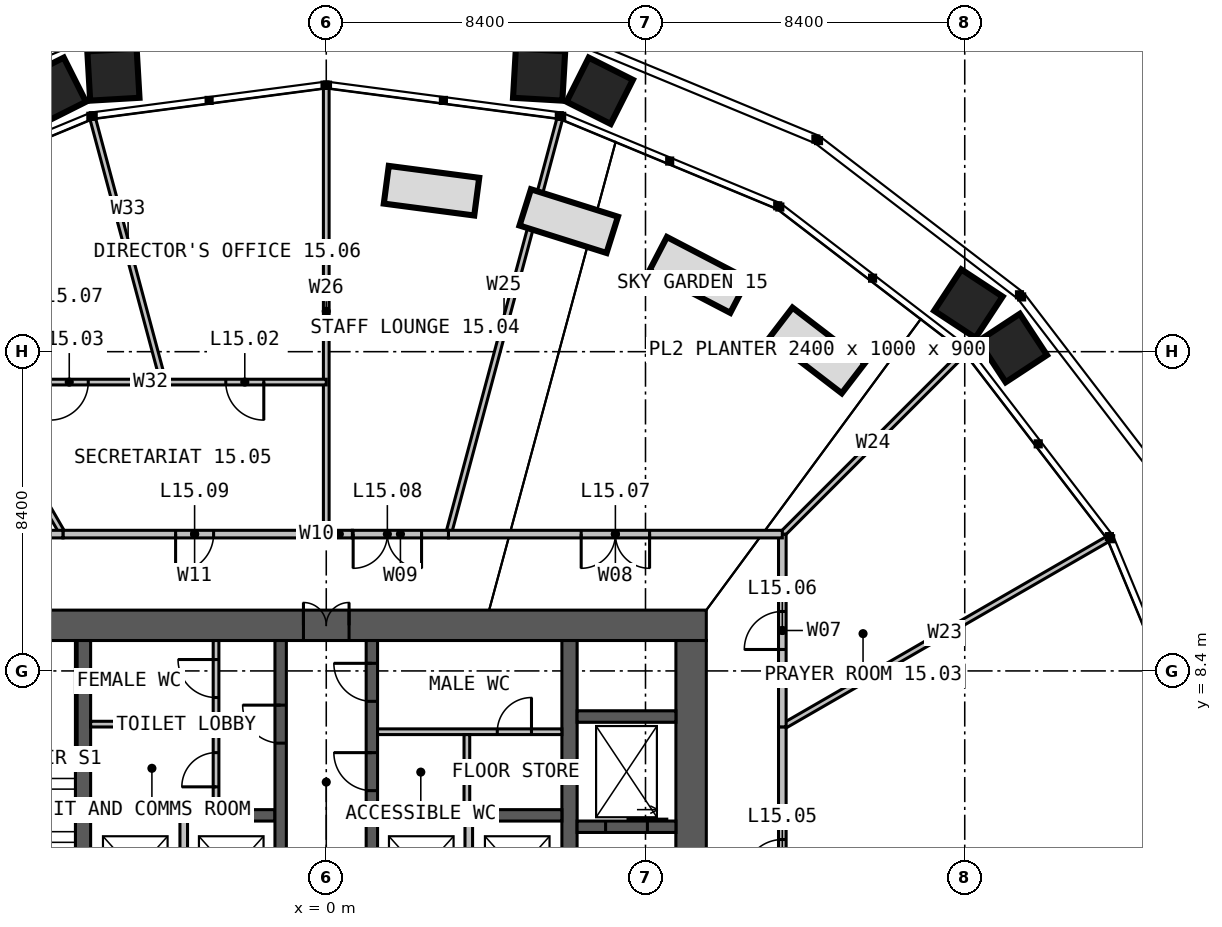
"""IFC4 building model, lengths in metres.
Left out: names, types, materials, properties, quantities, classifications, styles, units other than length and angle.
Written with IfcOpenShell. Run it as: python <this file> out.ifc"""

import sys

from ifc_helpers import new_model, si_unit, direction, frame, frame_2d, origin, place, context, subcontext, project, spatial, rectangle, extrude, element, fill, save


model = new_model("IFC4")
c1 = context("Model", 3, precision=1e-05, world=origin(), true_north=direction((0.0, 1.0)))
c2 = subcontext(c1, "Body", "Model", "MODEL_VIEW")
j1 = project(units=[si_unit("LENGTHUNIT", "METRE"), si_unit("PLANEANGLEUNIT", "RADIAN")], contexts=[c1])
p1 = place(None, origin())
s1 = spatial("IfcSite", under=j1, at=p1, CompositionType="ELEMENT")
p2 = place(p1, origin())
s2 = spatial("IfcBuilding", under=s1, at=p2, CompositionType="ELEMENT")
p3 = place(p2, frame((0.0, 0.0, 65.0)))
s3 = spatial("IfcBuildingStorey", under=s2, at=p3, CompositionType="ELEMENT", Elevation=65.0)
p4 = place(p3, frame((-10.0, 9.6, 0.0), z_axis=(0.0, 0.0, 1.0), x_axis=(1.0, 0.0, 0.0)))
e1 = element("IfcWall", 1, at=p4, inside=s3, PredefinedType="SOLIDWALL", context=c2, shape_type="SweptSolid", body=[
    extrude(rectangle(XDim=20.0, YDim=0.8, at=frame_2d((10.0, 0.0))), origin(), (0.0, 0.0, 1.0), 4.0),
])
p5 = place(p4, frame((9.4, 0.0, 0.0)))
e2 = element("IfcOpeningElement", 2, at=p5, cuts=e1, PredefinedType="OPENING", context=c2, shape_type="SweptSolid", body=[
    extrude(rectangle(XDim=1.2, YDim=2.2, at=frame_2d((0.6, 1.1))), frame((0.0, 0.41, 0.0), z_axis=(0.0, -1.0, 0.0), x_axis=(1.0, 0.0, 0.0)), (0.0, 0.0, 1.0), 0.82),
])
p6 = place(p3, frame((9.6, -9.2, 0.0), z_axis=(0.0, 0.0, 1.0), x_axis=(0.0, 1.0, 0.0)))
e3 = element("IfcWall", 3, at=p6, inside=s3, PredefinedType="SOLIDWALL", context=c2, shape_type="SweptSolid", body=[
    extrude(rectangle(XDim=18.4, YDim=0.8, at=frame_2d((9.2, 0.0))), origin(), (0.0, 0.0, 1.0), 4.0),
])
p7 = place(p3, frame((-6.4, -9.2, 0.0), z_axis=(0.0, 0.0, 1.0), x_axis=(0.0, 1.0, 0.0)))
e4 = element("IfcWall", 4, at=p7, inside=s3, PredefinedType="SOLIDWALL", context=c2, shape_type="SweptSolid", body=[
    extrude(rectangle(XDim=18.4, YDim=0.4, at=frame_2d((9.2, 0.0))), origin(), (0.0, 0.0, 1.0), 4.0),
])
p8 = place(p7, frame((8.7, 0.0, 0.0)))
e5 = element("IfcOpeningElement", 5, at=p8, cuts=e4, PredefinedType="OPENING", context=c2, shape_type="SweptSolid", body=[
    extrude(rectangle(XDim=1.0, YDim=2.2, at=frame_2d((0.5, 1.1))), frame((0.0, 0.21, 0.0), z_axis=(0.0, -1.0, 0.0), x_axis=(1.0, 0.0, 0.0)), (0.0, 0.0, 1.0), 0.42),
])
p9 = place(p3, frame((6.4, 9.2, 0.0), z_axis=(0.0, 0.0, 1.0), x_axis=(0.0, -1.0, 0.0)))
e6 = element("IfcWall", 6, at=p9, inside=s3, PredefinedType="SOLIDWALL", context=c2, shape_type="SweptSolid", body=[
    extrude(rectangle(XDim=18.4, YDim=0.4, at=frame_2d((9.2, 0.0))), origin(), (0.0, 0.0, 1.0), 4.0),
])
p10 = place(p9, frame((8.7, 0.0, 0.0)))
e7 = element("IfcOpeningElement", 7, at=p10, cuts=e6, PredefinedType="OPENING", context=c2, shape_type="SweptSolid", body=[
    extrude(rectangle(XDim=1.0, YDim=2.2, at=frame_2d((0.5, 1.1))), frame((0.0, 0.21, 0.0), z_axis=(0.0, -1.0, 0.0), x_axis=(1.0, 0.0, 0.0)), (0.0, 0.0, 1.0), 0.42),
])
for number, where, z_axis, x_axis in (
    (8, (-6.2, 4.6, 0.0), (0.0, 0.0, 1.0), (1.0, 0.0, 0.0)),
    (9, (1.35, 4.6, 0.0), (0.0, 0.0, 1.0), (1.0, 0.0, 0.0)),
):
    element("IfcWall", number, at=place(p3, frame(where, z_axis=z_axis, x_axis=x_axis)), inside=s3, PredefinedType="SOLIDWALL", context=c2, shape_type="SweptSolid", body=[
        extrude(rectangle(XDim=4.85, YDim=0.3, at=frame_2d((2.425, 0.0))), origin(), (0.0, 0.0, 1.0), 4.0),
    ])
p11 = place(p3, frame((-1.2, 1.45, 0.0), z_axis=(0.0, 0.0, 1.0), x_axis=(0.0, 1.0, 0.0)))
e10 = element("IfcWall", 10, at=p11, inside=s3, PredefinedType="SOLIDWALL", context=c2, shape_type="SweptSolid", body=[
    extrude(rectangle(XDim=7.75, YDim=0.3, at=frame_2d((3.875, 0.0))), origin(), (0.0, 0.0, 1.0), 4.0),
])
p12 = place(p11, frame((5.05, 0.0, 0.0)))
e11 = element("IfcOpeningElement", 11, at=p12, cuts=e10, PredefinedType="OPENING", context=c2, shape_type="SweptSolid", body=[
    extrude(rectangle(XDim=1.0, YDim=2.2, at=frame_2d((0.5, 1.1))), frame((0.0, 0.16, 0.0), z_axis=(0.0, -1.0, 0.0), x_axis=(1.0, 0.0, 0.0)), (0.0, 0.0, 1.0), 0.32),
])
p13 = place(p3, frame((1.2, 1.45, 0.0), z_axis=(0.0, 0.0, 1.0), x_axis=(0.0, 1.0, 0.0)))
e12 = element("IfcWall", 12, at=p13, inside=s3, PredefinedType="SOLIDWALL", context=c2, shape_type="SweptSolid", body=[
    extrude(rectangle(XDim=7.75, YDim=0.3, at=frame_2d((3.875, 0.0))), origin(), (0.0, 0.0, 1.0), 4.0),
])
p14 = place(p13, frame((3.8, 0.0, 0.0)))
e13 = element("IfcOpeningElement", 13, at=p14, cuts=e12, PredefinedType="OPENING", context=c2, shape_type="SweptSolid", body=[
    extrude(rectangle(XDim=1.0, YDim=2.2, at=frame_2d((0.5, 1.1))), frame((0.0, 0.16, 0.0), z_axis=(0.0, -1.0, 0.0), x_axis=(1.0, 0.0, 0.0)), (0.0, 0.0, 1.0), 0.32),
])
p15 = place(p13, frame((6.15, 0.0, 0.0)))
e14 = element("IfcOpeningElement", 14, at=p15, cuts=e12, PredefinedType="OPENING", context=c2, shape_type="SweptSolid", body=[
    extrude(rectangle(XDim=1.0, YDim=2.2, at=frame_2d((0.5, 1.1))), frame((0.0, 0.16, 0.0), z_axis=(0.0, -1.0, 0.0), x_axis=(1.0, 0.0, 0.0)), (0.0, 0.0, 1.0), 0.32),
])
p16 = place(p3, frame((6.6, 4.3, 0.0), z_axis=(0.0, 0.0, 1.0), x_axis=(1.0, 0.0, 0.0)))
e15 = element("IfcWall", 15, at=p16, inside=s3, PredefinedType="SOLIDWALL", context=c2, shape_type="SweptSolid", body=[
    extrude(rectangle(XDim=2.6, YDim=0.3, at=frame_2d((1.3, 0.0))), origin(), (0.0, 0.0, 1.0), 4.0),
])
p17 = place(p16, frame((0.75, 0.0, 0.0)))
e16 = element("IfcOpeningElement", 16, at=p17, cuts=e15, PredefinedType="OPENING", context=c2, shape_type="SweptSolid", body=[
    extrude(rectangle(XDim=1.1, YDim=2.2, at=frame_2d((0.55, 1.1))), frame((0.0, 0.16, 0.0), z_axis=(0.0, -1.0, 0.0), x_axis=(1.0, 0.0, 0.0)), (0.0, 0.0, 1.0), 0.32),
])
p18 = place(p3, frame((6.6, 7.2, 0.0), z_axis=(0.0, 0.0, 1.0), x_axis=(1.0, 0.0, 0.0)))
e17 = element("IfcWall", 17, at=p18, inside=s3, PredefinedType="SOLIDWALL", context=c2, shape_type="SweptSolid", body=[
    extrude(rectangle(XDim=2.6, YDim=0.3, at=frame_2d((1.3, 0.0))), origin(), (0.0, 0.0, 1.0), 4.0),
])
for number, where, z_axis, x_axis in (
    (18, (-3.75, 1.75, 0.0), (0.0, 0.0, 1.0), (0.0, 1.0, 0.0)),
    (19, (3.75, 1.75, 0.0), (0.0, 0.0, 1.0), (0.0, 1.0, 0.0)),
):
    element("IfcWall", number, at=place(p3, frame(where, z_axis=z_axis, x_axis=x_axis)), inside=s3, PredefinedType="SOLIDWALL", context=c2, shape_type="SweptSolid", body=[
        extrude(rectangle(XDim=2.7, YDim=0.2, at=frame_2d((1.35, 0.0))), origin(), (0.0, 0.0, 1.0), 3.75),
    ])
p19 = place(p3, frame((1.35, 6.8, 0.0), z_axis=(0.0, 0.0, 1.0), x_axis=(1.0, 0.0, 0.0)))
e20 = element("IfcWall", 20, at=p19, inside=s3, PredefinedType="PARTITIONING", context=c2, shape_type="SweptSolid", body=[
    extrude(rectangle(XDim=4.85, YDim=0.15, at=frame_2d((2.425, 0.0))), origin(), (0.0, 0.0, 1.0), 3.75),
])
p20 = place(p19, frame((3.15, 0.0, 0.0)))
e21 = element("IfcOpeningElement", 21, at=p20, cuts=e20, PredefinedType="OPENING", context=c2, shape_type="SweptSolid", body=[
    extrude(rectangle(XDim=0.9, YDim=2.2, at=frame_2d((0.45, 1.1))), frame((0.0, 0.085, 0.0), z_axis=(0.0, -1.0, 0.0), x_axis=(1.0, 0.0, 0.0)), (0.0, 0.0, 1.0), 0.17),
])
p21 = place(p3, frame((3.7, 4.75, 0.0), z_axis=(0.0, 0.0, 1.0), x_axis=(0.0, 1.0, 0.0)))
e22 = element("IfcWall", 22, at=p21, inside=s3, PredefinedType="PARTITIONING", context=c2, shape_type="SweptSolid", body=[
    extrude(rectangle(XDim=1.975, YDim=0.15, at=frame_2d((0.988, 0.0))), origin(), (0.0, 0.0, 1.0), 3.75),
])
p22 = place(p3, frame((-2.9, 4.75, 0.0), z_axis=(0.0, 0.0, 1.0), x_axis=(0.0, 1.0, 0.0)))
e23 = element("IfcWall", 23, at=p22, inside=s3, PredefinedType="PARTITIONING", context=c2, shape_type="SweptSolid", body=[
    extrude(rectangle(XDim=4.45, YDim=0.15, at=frame_2d((2.225, 0.0))), origin(), (0.0, 0.0, 1.0), 3.75),
])
p23 = place(p22, frame((2.95, 0.0, 0.0)))
e24 = element("IfcOpeningElement", 24, at=p23, cuts=e23, PredefinedType="OPENING", context=c2, shape_type="SweptSolid", body=[
    extrude(rectangle(XDim=1.0, YDim=2.2, at=frame_2d((0.5, 1.1))), frame((0.0, 0.085, 0.0), z_axis=(0.0, -1.0, 0.0), x_axis=(1.0, 0.0, 0.0)), (0.0, 0.0, 1.0), 0.17),
])
p24 = place(p22, frame((0.6, 0.0, 0.0)))
e25 = element("IfcOpeningElement", 25, at=p24, cuts=e23, PredefinedType="OPENING", context=c2, shape_type="SweptSolid", body=[
    extrude(rectangle(XDim=0.9, YDim=2.2, at=frame_2d((0.45, 1.1))), frame((0.0, 0.085, 0.0), z_axis=(0.0, -1.0, 0.0), x_axis=(1.0, 0.0, 0.0)), (0.0, 0.0, 1.0), 0.17),
])
p25 = place(p3, frame((-6.2, 7.0, 0.0), z_axis=(0.0, 0.0, 1.0), x_axis=(1.0, 0.0, 0.0)))
e26 = element("IfcWall", 26, at=p25, inside=s3, PredefinedType="PARTITIONING", context=c2, shape_type="SweptSolid", body=[
    extrude(rectangle(XDim=3.225, YDim=0.15, at=frame_2d((1.612, 0.0))), origin(), (0.0, 0.0, 1.0), 3.75),
])
p26 = place(p3, frame((12.0, 6.928, 0.0), z_axis=(0.0, 0.0, 1.0), x_axis=(0.866031940362, 0.499988678145, 0.0)))
e27 = element("IfcWall", 27, at=p26, inside=s3, PredefinedType="PARTITIONING", context=c2, shape_type="SweptSolid", body=[
    extrude(rectangle(XDim=9.87, YDim=0.15, at=frame_2d((4.935, 0.0))), origin(), (0.0, 0.0, 1.0), 2.79),
])
p27 = place(p3, frame((12.0, 12.0, 0.0), z_axis=(0.0, 0.0, 1.0), x_axis=(0.707106781187, 0.707106781187, 0.0)))
e28 = element("IfcWall", 28, at=p27, inside=s3, PredefinedType="PARTITIONING", context=c2, shape_type="SweptSolid", body=[
    extrude(rectangle(XDim=6.756, YDim=0.15, at=frame_2d((3.378, 0.0))), origin(), (0.0, 0.0, 1.0), 2.79),
])
p28 = place(p3, frame((3.215, 12.0, 0.0), z_axis=(0.0, 0.0, 1.0), x_axis=(0.258830735057, 0.965922693899, 0.0)))
e29 = element("IfcWall", 29, at=p28, inside=s3, PredefinedType="PARTITIONING", context=c2, shape_type="SweptSolid", body=[
    extrude(rectangle(XDim=11.303, YDim=0.15, at=frame_2d((5.651, 0.0))), origin(), (0.0, 0.0, 1.0), 2.79),
])
p29 = place(p3, frame((0.0, 12.0, 0.0), z_axis=(0.0, 0.0, 1.0), x_axis=(0.0, 1.0, 0.0)))
e30 = element("IfcWall", 30, at=p29, inside=s3, PredefinedType="PARTITIONING", context=c2, shape_type="SweptSolid", body=[
    extrude(rectangle(XDim=11.726, YDim=0.15, at=frame_2d((5.863, 0.0))), origin(), (0.0, 0.0, 1.0), 2.79),
])
p30 = place(p3, frame((-6.928, 12.0, 0.0), z_axis=(0.0, 0.0, 1.0), x_axis=(-0.499988678145, 0.866031940362, 0.0)))
e31 = element("IfcWall", 31, at=p30, inside=s3, PredefinedType="PARTITIONING", context=c2, shape_type="SweptSolid", body=[
    extrude(rectangle(XDim=9.87, YDim=0.15, at=frame_2d((4.935, 0.0))), origin(), (0.0, 0.0, 1.0), 2.79),
])
p31 = place(p3, frame((12.0, 0.0, 0.0), z_axis=(0.0, 0.0, 1.0), x_axis=(0.0, 1.0, 0.0)))
e32 = element("IfcWall", 32, at=p31, inside=s3, PredefinedType="PARTITIONING", context=c2, shape_type="SweptSolid", body=[
    extrude(rectangle(XDim=6.928, YDim=0.2, at=frame_2d((3.464, 0.0))), origin(), (0.0, 0.0, 1.0), 3.8),
])
p32 = place(p31, frame((2.964, 0.0, 0.0)))
e33 = element("IfcOpeningElement", 33, at=p32, cuts=e32, PredefinedType="OPENING", context=c2, shape_type="SweptSolid", body=[
    extrude(rectangle(XDim=1.0, YDim=2.2, at=frame_2d((0.5, 1.1))), frame((0.0, 0.11, 0.0), z_axis=(0.0, -1.0, 0.0), x_axis=(1.0, 0.0, 0.0)), (0.0, 0.0, 1.0), 0.22),
])
p33 = place(p3, frame((12.0, 6.928, 0.0), z_axis=(0.0, 0.0, 1.0), x_axis=(0.0, 1.0, 0.0)))
e34 = element("IfcWall", 34, at=p33, inside=s3, PredefinedType="PARTITIONING", context=c2, shape_type="SweptSolid", body=[
    extrude(rectangle(XDim=5.072, YDim=0.2, at=frame_2d((2.536, 0.0))), origin(), (0.0, 0.0, 1.0), 3.8),
])
p34 = place(p33, frame((2.036, 0.0, 0.0)))
e35 = element("IfcOpeningElement", 35, at=p34, cuts=e34, PredefinedType="OPENING", context=c2, shape_type="SweptSolid", body=[
    extrude(rectangle(XDim=1.0, YDim=2.2, at=frame_2d((0.5, 1.1))), frame((0.0, 0.11, 0.0), z_axis=(0.0, -1.0, 0.0), x_axis=(1.0, 0.0, 0.0)), (0.0, 0.0, 1.0), 0.22),
])
p35 = place(p3, frame((12.0, 12.0, 0.0), z_axis=(0.0, 0.0, 1.0), x_axis=(-1.0, 0.0, 0.0)))
e36 = element("IfcWall", 36, at=p35, inside=s3, PredefinedType="PARTITIONING", context=c2, shape_type="SweptSolid", body=[
    extrude(rectangle(XDim=8.785, YDim=0.2, at=frame_2d((4.392, 0.0))), origin(), (0.0, 0.0, 1.0), 3.2),
])
p36 = place(p35, frame((3.492, 0.0, 0.0)))
e37 = element("IfcOpeningElement", 37, at=p36, cuts=e36, PredefinedType="OPENING", context=c2, shape_type="SweptSolid", body=[
    extrude(rectangle(XDim=1.8, YDim=2.2, at=frame_2d((0.9, 1.1))), frame((0.0, 0.11, 0.0), z_axis=(0.0, -1.0, 0.0), x_axis=(1.0, 0.0, 0.0)), (0.0, 0.0, 1.0), 0.22),
])
p37 = place(p3, frame((3.215, 12.0, 0.0), z_axis=(0.0, 0.0, 1.0), x_axis=(-1.0, 0.0, 0.0)))
e38 = element("IfcWall", 38, at=p37, inside=s3, PredefinedType="PARTITIONING", context=c2, shape_type="SweptSolid", body=[
    extrude(rectangle(XDim=2.528, YDim=0.2, at=frame_2d((1.264, 0.0))), origin(), (0.0, 0.0, 1.0), 3.2),
])
p38 = place(p37, frame((0.708, 0.0, 0.0)))
e39 = element("IfcOpeningElement", 39, at=p38, cuts=e38, PredefinedType="OPENING", context=c2, shape_type="SweptSolid", body=[
    extrude(rectangle(XDim=1.8, YDim=2.2, at=frame_2d((0.9, 1.1))), frame((0.0, 0.11, 0.0), z_axis=(0.0, -1.0, 0.0), x_axis=(1.0, 0.0, 0.0)), (0.0, 0.0, 1.0), 0.22),
])
p39 = place(p3, frame((0.688, 12.0, 0.0), z_axis=(0.0, 0.0, 1.0), x_axis=(-1.0, 0.0, 0.0)))
e40 = element("IfcWall", 40, at=p39, inside=s3, PredefinedType="PARTITIONING", context=c2, shape_type="SweptSolid", body=[
    extrude(rectangle(XDim=0.688, YDim=0.2, at=frame_2d((0.344, 0.0))), origin(), (0.0, 0.0, 1.0), 3.8),
])
p40 = place(p3, frame((0.0, 16.0, 0.0), z_axis=(0.0, 0.0, 1.0), x_axis=(-1.0, 0.0, 0.0)))
e41 = element("IfcWall", 41, at=p40, inside=s3, PredefinedType="PARTITIONING", context=c2, shape_type="SweptSolid", body=[
    extrude(rectangle(XDim=9.238, YDim=0.15, at=frame_2d((4.619, 0.0))), origin(), (0.0, 0.0, 1.0), 2.79),
])
p41 = place(p40, frame((1.644, 0.0, 0.0)))
e42 = element("IfcOpeningElement", 42, at=p41, cuts=e41, PredefinedType="OPENING", context=c2, shape_type="SweptSolid", body=[
    extrude(rectangle(XDim=1.0, YDim=2.2, at=frame_2d((0.5, 1.1))), frame((0.0, 0.085, 0.0), z_axis=(0.0, -1.0, 0.0), x_axis=(1.0, 0.0, 0.0)), (0.0, 0.0, 1.0), 0.17),
])
p42 = place(p40, frame((6.262, 0.0, 0.0)))
e43 = element("IfcOpeningElement", 43, at=p42, cuts=e41, PredefinedType="OPENING", context=c2, shape_type="SweptSolid", body=[
    extrude(rectangle(XDim=1.0, YDim=2.2, at=frame_2d((0.5, 1.1))), frame((0.0, 0.085, 0.0), z_axis=(0.0, -1.0, 0.0), x_axis=(1.0, 0.0, 0.0)), (0.0, 0.0, 1.0), 0.17),
])
p43 = place(p3, frame((-4.287, 16.0, 0.0), z_axis=(0.0, 0.0, 1.0), x_axis=(-0.258840025144, 0.96592020446, 0.0)))
e44 = element("IfcWall", 44, at=p43, inside=s3, PredefinedType="PARTITIONING", context=c2, shape_type="SweptSolid", body=[
    extrude(rectangle(XDim=7.162, YDim=0.15, at=frame_2d((3.581, 0.0))), origin(), (0.0, 0.0, 1.0), 2.79),
])
p44 = place(p3, frame((0.0, 12.0, 0.0), z_axis=(0.0, 0.0, 1.0), x_axis=(-1.0, 0.0, 0.0)))
e45 = element("IfcWall", 45, at=p44, inside=s3, PredefinedType="PARTITIONING", context=c2, shape_type="SweptSolid", body=[
    extrude(rectangle(XDim=6.928, YDim=0.2, at=frame_2d((3.464, 0.0))), origin(), (0.0, 0.0, 1.0), 3.8),
])
p45 = place(p44, frame((2.964, 0.0, 0.0)))
e46 = element("IfcOpeningElement", 46, at=p45, cuts=e45, PredefinedType="OPENING", context=c2, shape_type="SweptSolid", body=[
    extrude(rectangle(XDim=1.0, YDim=2.2, at=frame_2d((0.5, 1.1))), frame((0.0, 0.11, 0.0), z_axis=(0.0, -1.0, 0.0), x_axis=(1.0, 0.0, 0.0)), (0.0, 0.0, 1.0), 0.22),
])
p46 = place(p3, frame((-6.928, 12.0, 0.0), z_axis=(0.0, 0.0, 1.0), x_axis=(-1.0, 0.0, 0.0)))
e47 = element("IfcWall", 47, at=p46, inside=s3, PredefinedType="PARTITIONING", context=c2, shape_type="SweptSolid", body=[
    extrude(rectangle(XDim=5.072, YDim=0.2, at=frame_2d((2.536, 0.0))), origin(), (0.0, 0.0, 1.0), 3.8),
])
p47 = place(p5, origin())
e48 = element("IfcDoor", 48, at=p47, inside=s3, OperationType="DOUBLE_DOOR_SINGLE_SWING", PredefinedType="DOOR", context=c2, shape_type="SweptSolid", body=[
    extrude(rectangle(XDim=1.2, YDim=2.2, at=frame_2d((0.6, 1.1))), frame((0.0, 0.025, 0.0), z_axis=(0.0, -1.0, 0.0), x_axis=(1.0, 0.0, 0.0)), (0.0, 0.0, 1.0), 0.05),
])
fill(e2, e48)
p48 = place(p12, origin())
e49 = element("IfcDoor", 49, at=p48, inside=s3, OperationType="SINGLE_SWING_RIGHT", PredefinedType="DOOR", context=c2, shape_type="SweptSolid", body=[
    extrude(rectangle(XDim=1.0, YDim=2.2, at=frame_2d((0.5, 1.1))), frame((0.0, 0.025, 0.0), z_axis=(0.0, -1.0, 0.0), x_axis=(1.0, 0.0, 0.0)), (0.0, 0.0, 1.0), 0.05),
])
fill(e11, e49)
p49 = place(p14, origin())
e50 = element("IfcDoor", 50, at=p49, inside=s3, OperationType="SINGLE_SWING_RIGHT", PredefinedType="DOOR", context=c2, shape_type="SweptSolid", body=[
    extrude(rectangle(XDim=1.0, YDim=2.2, at=frame_2d((0.5, 1.1))), frame((0.0, 0.025, 0.0), z_axis=(0.0, -1.0, 0.0), x_axis=(1.0, 0.0, 0.0)), (0.0, 0.0, 1.0), 0.05),
])
fill(e13, e50)
p50 = place(p15, origin())
e51 = element("IfcDoor", 51, at=p50, inside=s3, OperationType="SINGLE_SWING_RIGHT", PredefinedType="DOOR", context=c2, shape_type="SweptSolid", body=[
    extrude(rectangle(XDim=1.0, YDim=2.2, at=frame_2d((0.5, 1.1))), frame((0.0, 0.025, 0.0), z_axis=(0.0, -1.0, 0.0), x_axis=(1.0, 0.0, 0.0)), (0.0, 0.0, 1.0), 0.05),
])
fill(e14, e51)
p51 = place(p20, origin())
e52 = element("IfcDoor", 52, at=p51, inside=s3, OperationType="SINGLE_SWING_RIGHT", PredefinedType="DOOR", context=c2, shape_type="SweptSolid", body=[
    extrude(rectangle(XDim=0.9, YDim=2.2, at=frame_2d((0.45, 1.1))), frame((0.0, 0.025, 0.0), z_axis=(0.0, -1.0, 0.0), x_axis=(1.0, 0.0, 0.0)), (0.0, 0.0, 1.0), 0.05),
])
fill(e21, e52)
p52 = place(p23, origin())
e53 = element("IfcDoor", 53, at=p52, inside=s3, OperationType="SINGLE_SWING_RIGHT", PredefinedType="DOOR", context=c2, shape_type="SweptSolid", body=[
    extrude(rectangle(XDim=1.0, YDim=2.2, at=frame_2d((0.5, 1.1))), frame((0.0, 0.025, 0.0), z_axis=(0.0, -1.0, 0.0), x_axis=(1.0, 0.0, 0.0)), (0.0, 0.0, 1.0), 0.05),
])
fill(e24, e53)
p53 = place(p24, origin())
e54 = element("IfcDoor", 54, at=p53, inside=s3, OperationType="SINGLE_SWING_LEFT", PredefinedType="DOOR", context=c2, shape_type="SweptSolid", body=[
    extrude(rectangle(XDim=0.9, YDim=2.2, at=frame_2d((0.45, 1.1))), frame((0.0, 0.025, 0.0), z_axis=(0.0, -1.0, 0.0), x_axis=(1.0, 0.0, 0.0)), (0.0, 0.0, 1.0), 0.05),
])
fill(e25, e54)
p54 = place(p17, origin())
e55 = element("IfcDoor", 55, at=p54, inside=s3, OperationType="SLIDING_TO_LEFT", PredefinedType="DOOR", context=c2, shape_type="SweptSolid", body=[
    extrude(rectangle(XDim=1.1, YDim=2.2, at=frame_2d((0.55, 1.1))), frame((0.0, 0.025, 0.0), z_axis=(0.0, -1.0, 0.0), x_axis=(1.0, 0.0, 0.0)), (0.0, 0.0, 1.0), 0.05),
])
fill(e16, e55)
p55 = place(p32, origin())
e56 = element("IfcDoor", 56, at=p55, inside=s3, OperationType="SINGLE_SWING_LEFT", PredefinedType="DOOR", context=c2, shape_type="SweptSolid", body=[
    extrude(rectangle(XDim=1.0, YDim=2.2, at=frame_2d((0.5, 1.1))), frame((0.0, 0.025, 0.0), z_axis=(0.0, -1.0, 0.0), x_axis=(1.0, 0.0, 0.0)), (0.0, 0.0, 1.0), 0.05),
])
fill(e33, e56)
p56 = place(p34, origin())
e57 = element("IfcDoor", 57, at=p56, inside=s3, OperationType="SINGLE_SWING_LEFT", PredefinedType="DOOR", context=c2, shape_type="SweptSolid", body=[
    extrude(rectangle(XDim=1.0, YDim=2.2, at=frame_2d((0.5, 1.1))), frame((0.0, 0.025, 0.0), z_axis=(0.0, -1.0, 0.0), x_axis=(1.0, 0.0, 0.0)), (0.0, 0.0, 1.0), 0.05),
])
fill(e35, e57)
p57 = place(p36, origin())
e58 = element("IfcDoor", 58, at=p57, inside=s3, OperationType="DOUBLE_DOOR_SINGLE_SWING", PredefinedType="DOOR", context=c2, shape_type="SweptSolid", body=[
    extrude(rectangle(XDim=1.8, YDim=2.2, at=frame_2d((0.9, 1.1))), frame((0.0, 0.025, 0.0), z_axis=(0.0, -1.0, 0.0), x_axis=(1.0, 0.0, 0.0)), (0.0, 0.0, 1.0), 0.05),
])
fill(e37, e58)
p58 = place(p38, origin())
e59 = element("IfcDoor", 59, at=p58, inside=s3, OperationType="DOUBLE_DOOR_SINGLE_SWING", PredefinedType="DOOR", context=c2, shape_type="SweptSolid", body=[
    extrude(rectangle(XDim=1.8, YDim=2.2, at=frame_2d((0.9, 1.1))), frame((0.0, 0.025, 0.0), z_axis=(0.0, -1.0, 0.0), x_axis=(1.0, 0.0, 0.0)), (0.0, 0.0, 1.0), 0.05),
])
fill(e39, e59)
p59 = place(p41, origin())
e60 = element("IfcDoor", 60, at=p59, inside=s3, OperationType="SINGLE_SWING_LEFT", PredefinedType="DOOR", context=c2, shape_type="SweptSolid", body=[
    extrude(rectangle(XDim=1.0, YDim=2.2, at=frame_2d((0.5, 1.1))), frame((0.0, 0.025, 0.0), z_axis=(0.0, -1.0, 0.0), x_axis=(1.0, 0.0, 0.0)), (0.0, 0.0, 1.0), 0.05),
])
fill(e42, e60)
p60 = place(p42, origin())
e61 = element("IfcDoor", 61, at=p60, inside=s3, OperationType="SINGLE_SWING_RIGHT", PredefinedType="DOOR", context=c2, shape_type="SweptSolid", body=[
    extrude(rectangle(XDim=1.0, YDim=2.2, at=frame_2d((0.5, 1.1))), frame((0.0, 0.025, 0.0), z_axis=(0.0, -1.0, 0.0), x_axis=(1.0, 0.0, 0.0)), (0.0, 0.0, 1.0), 0.05),
])
fill(e43, e61)
p61 = place(p45, origin())
e62 = element("IfcDoor", 62, at=p61, inside=s3, OperationType="SINGLE_SWING_RIGHT", PredefinedType="DOOR", context=c2, shape_type="SweptSolid", body=[
    extrude(rectangle(XDim=1.0, YDim=2.2, at=frame_2d((0.5, 1.1))), frame((0.0, 0.025, 0.0), z_axis=(0.0, -1.0, 0.0), x_axis=(1.0, 0.0, 0.0)), (0.0, 0.0, 1.0), 0.05),
])
fill(e46, e62)
save(model, sys.argv[1])
